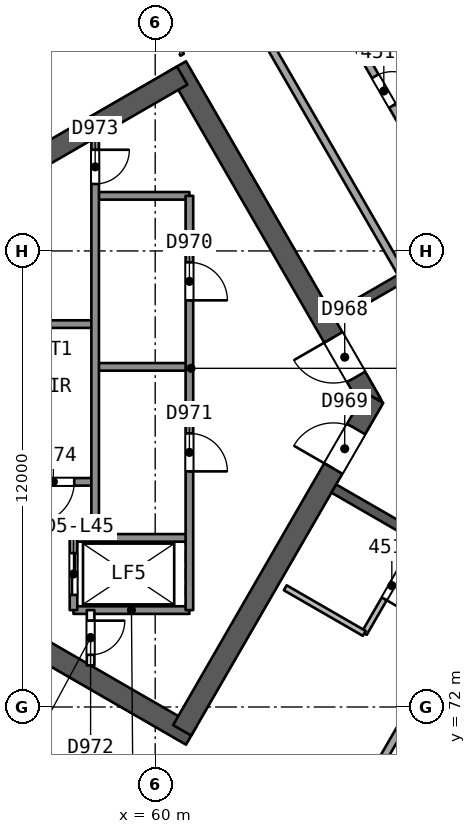
"""IFC4 building model, lengths in metres.
Left out: names, types, materials, properties, quantities, classifications, styles, units other than length and angle.
Written with IfcOpenShell. Run it as: python <this file> out.ifc"""

import sys

from ifc_helpers import new_model, si_unit, direction, frame, frame_2d, origin, place, context, subcontext, project, spatial, rectangle, extrude, element, fill, save


model = new_model("IFC4")
c1 = context("Model", 3, precision=1e-05, world=origin(), true_north=direction((0.0, 1.0)))
c2 = subcontext(c1, "Body", "Model", "MODEL_VIEW")
j1 = project(units=[si_unit("LENGTHUNIT", "METRE"), si_unit("PLANEANGLEUNIT", "RADIAN")], contexts=[c1])
p1 = place(None, origin())
s1 = spatial("IfcSite", under=j1, at=p1, CompositionType="ELEMENT")
p2 = place(p1, origin())
s2 = spatial("IfcBuilding", under=s1, at=p2, CompositionType="ELEMENT")
p3 = place(p2, frame((0.0, 0.0, 185.9)))
s3 = spatial("IfcBuildingStorey", under=s2, at=p3, CompositionType="ELEMENT", Elevation=185.9)
p4 = place(p3, frame((65.682, 80.0, 0.0), z_axis=(0.0, 0.0, 1.0), x_axis=(-0.500000202252, 0.866025287014, 0.0)))
e1 = element("IfcWall", 1, at=p4, inside=s3, PredefinedType="SHEAR", context=c2, shape_type="SweptSolid", body=[
    extrude(rectangle(XDim=10.221, YDim=0.55, at=frame_2d((5.111, 0.0))), origin(), (0.0, 0.0, 1.0), 3.7),
])
p5 = place(p4, frame((0.791, 0.0, 0.0)))
e2 = element("IfcOpeningElement", 2, at=p5, cuts=e1, PredefinedType="OPENING", context=c2, shape_type="SweptSolid", body=[
    extrude(rectangle(XDim=1.2, YDim=2.1, at=frame_2d((0.6, 1.05))), frame((0.0, 0.286, 0.0), z_axis=(0.0, -1.0, 0.0), x_axis=(1.0, 0.0, 0.0)), (0.0, 0.0, 1.0), 0.571),
])
p6 = place(p3, frame((60.709, 88.614, 0.0), z_axis=(0.0, 0.0, 1.0), x_axis=(-0.866020164116, -0.500009075263, 0.0)))
e3 = element("IfcWall", 3, at=p6, inside=s3, PredefinedType="SHEAR", context=c2, shape_type="SweptSolid", body=[
    extrude(rectangle(XDim=14.058, YDim=0.55, at=frame_2d((7.029, 0.0))), origin(), (0.0, 0.0, 1.0), 3.7),
])
p7 = place(p3, frame((48.672, 78.336, 0.0), z_axis=(0.0, 0.0, 1.0), x_axis=(0.866023530946, -0.500003243837, 0.0)))
e4 = element("IfcWall", 4, at=p7, inside=s3, PredefinedType="SHEAR", context=c2, shape_type="SweptSolid", body=[
    extrude(rectangle(XDim=14.175, YDim=0.55, at=frame_2d((7.087, 0.0))), origin(), (0.0, 0.0, 1.0), 3.7),
])
p8 = place(p3, frame((60.709, 71.386, 0.0), z_axis=(0.0, 0.0, 1.0), x_axis=(0.500015938302, 0.866016201606, 0.0)))
e5 = element("IfcWall", 5, at=p8, inside=s3, PredefinedType="SHEAR", context=c2, shape_type="SweptSolid", body=[
    extrude(rectangle(XDim=10.105, YDim=0.55, at=frame_2d((5.053, 0.0))), origin(), (0.0, 0.0, 1.0), 3.7),
])
p9 = place(p8, frame((7.955, 0.0, 0.0)))
e6 = element("IfcOpeningElement", 6, at=p9, cuts=e5, PredefinedType="OPENING", context=c2, shape_type="SweptSolid", body=[
    extrude(rectangle(XDim=1.2, YDim=2.1, at=frame_2d((0.6, 1.05))), frame((0.0, 0.286, 0.0), z_axis=(0.0, -1.0, 0.0), x_axis=(1.0, 0.0, 0.0)), (0.0, 0.0, 1.0), 0.571),
])
p10 = place(p3, frame((78.2, 90.046, 0.0), z_axis=(0.0, 0.0, 1.0), x_axis=(-0.866026492143, -0.499998114903, 0.0)))
e7 = element("IfcWall", 7, at=p10, inside=s3, PredefinedType="SHEAR", context=c2, shape_type="SweptSolid", body=[
    extrude(rectangle(XDim=15.588, YDim=0.25, at=frame_2d((7.794, 0.0))), origin(), (0.0, 0.0, 1.0), 3.25),
])
p11 = place(p10, frame((3.138, 0.0, 0.0)))
e8 = element("IfcOpeningElement", 8, at=p11, cuts=e7, PredefinedType="OPENING", context=c2, shape_type="SweptSolid", body=[
    extrude(rectangle(XDim=1.0, YDim=2.1, at=frame_2d((0.5, 1.05))), frame((0.0, 0.135, 0.0), z_axis=(0.0, -1.0, 0.0), x_axis=(1.0, 0.0, 0.0)), (0.0, 0.0, 1.0), 0.271),
])
p12 = place(p10, frame((6.415, 0.0, 0.0)))
e9 = element("IfcOpeningElement", 9, at=p12, cuts=e7, PredefinedType="OPENING", context=c2, shape_type="SweptSolid", body=[
    extrude(rectangle(XDim=1.2, YDim=2.4, at=frame_2d((0.6, 1.2))), frame((0.0, 0.135, 0.0), z_axis=(0.0, -1.0, 0.0), x_axis=(1.0, 0.0, 0.0)), (0.0, 0.0, 1.0), 0.271),
])
p13 = place(p10, frame((11.971, 0.0, 0.0)))
e10 = element("IfcOpeningElement", 10, at=p13, cuts=e7, PredefinedType="OPENING", context=c2, shape_type="SweptSolid", body=[
    extrude(rectangle(XDim=1.0, YDim=2.1, at=frame_2d((0.5, 1.05))), frame((0.0, 0.135, 0.0), z_axis=(0.0, -1.0, 0.0), x_axis=(1.0, 0.0, 0.0)), (0.0, 0.0, 1.0), 0.271),
])
p14 = place(p3, frame((64.7, 77.748, 0.0), z_axis=(0.0, 0.0, 1.0), x_axis=(0.866026492143, -0.499998114903, 0.0)))
e11 = element("IfcWall", 11, at=p14, inside=s3, PredefinedType="SHEAR", context=c2, shape_type="SweptSolid", body=[
    extrude(rectangle(XDim=15.588, YDim=0.25, at=frame_2d((7.794, 0.0))), origin(), (0.0, 0.0, 1.0), 3.25),
])
p15 = place(p14, frame((3.138, 0.0, 0.0)))
e12 = element("IfcOpeningElement", 12, at=p15, cuts=e11, PredefinedType="OPENING", context=c2, shape_type="SweptSolid", body=[
    extrude(rectangle(XDim=1.0, YDim=2.1, at=frame_2d((0.5, 1.05))), frame((0.0, 0.135, 0.0), z_axis=(0.0, -1.0, 0.0), x_axis=(1.0, 0.0, 0.0)), (0.0, 0.0, 1.0), 0.271),
])
p16 = place(p14, frame((6.175, 0.0, 0.0)))
e13 = element("IfcOpeningElement", 13, at=p16, cuts=e11, PredefinedType="OPENING", context=c2, shape_type="SweptSolid", body=[
    extrude(rectangle(XDim=0.9, YDim=2.1, at=frame_2d((0.45, 1.05))), frame((0.0, 0.135, 0.0), z_axis=(0.0, -1.0, 0.0), x_axis=(1.0, 0.0, 0.0)), (0.0, 0.0, 1.0), 0.271),
])
p17 = place(p14, frame((10.072, 0.0, 0.0)))
e14 = element("IfcOpeningElement", 14, at=p17, cuts=e11, PredefinedType="OPENING", context=c2, shape_type="SweptSolid", body=[
    extrude(rectangle(XDim=0.9, YDim=2.1, at=frame_2d((0.45, 1.05))), frame((0.0, 0.135, 0.0), z_axis=(0.0, -1.0, 0.0), x_axis=(1.0, 0.0, 0.0)), (0.0, 0.0, 1.0), 0.271),
])
p18 = place(p14, frame((13.53, 0.0, 0.0)))
e15 = element("IfcOpeningElement", 15, at=p18, cuts=e11, PredefinedType="OPENING", context=c2, shape_type="SweptSolid", body=[
    extrude(rectangle(XDim=1.0, YDim=2.1, at=frame_2d((0.5, 1.05))), frame((0.0, 0.135, 0.0), z_axis=(0.0, -1.0, 0.0), x_axis=(1.0, 0.0, 0.0)), (0.0, 0.0, 1.0), 0.271),
])
p19 = place(p3, frame((64.548, 94.985, 0.0), z_axis=(0.0, 0.0, 1.0), x_axis=(0.499998432514, -0.866026308771, 0.0)))
e16 = element("IfcWall", 16, at=p19, inside=s3, PredefinedType="PARTITIONING", context=c2, shape_type="SweptSolid", body=[
    extrude(rectangle(XDim=11.104, YDim=0.2, at=frame_2d((5.552, 0.0))), origin(), (0.0, 0.0, 1.0), 3.25),
])
p20 = place(p3, frame((59.148, 91.868, 0.0), z_axis=(0.0, 0.0, 1.0), x_axis=(0.4999794672, -0.866037258078, 0.0)))
e17 = element("IfcWall", 17, at=p20, inside=s3, PredefinedType="PARTITIONING", context=c2, shape_type="SweptSolid", body=[
    extrude(rectangle(XDim=3.125, YDim=0.1, at=frame_2d((1.562, 0.0))), origin(), (0.0, 0.0, 1.0), 3.25),
])
p21 = place(p20, frame((1.112, 0.0, 0.0)))
e18 = element("IfcOpeningElement", 18, at=p21, cuts=e17, PredefinedType="OPENING", context=c2, shape_type="SweptSolid", body=[
    extrude(rectangle(XDim=0.9, YDim=2.1, at=frame_2d((0.45, 1.05))), frame((0.0, 0.061, 0.0), z_axis=(0.0, -1.0, 0.0), x_axis=(1.0, 0.0, 0.0)), (0.0, 0.0, 1.0), 0.121),
])
p22 = place(p3, frame((66.534, 83.311, 0.0), z_axis=(0.0, 0.0, 1.0), x_axis=(-0.5000018851, 0.866024315419, 0.0)))
e19 = element("IfcWall", 19, at=p22, inside=s3, PredefinedType="PARTITIONING", context=c2, shape_type="SweptSolid", body=[
    extrude(rectangle(XDim=9.0, YDim=0.2, at=frame_2d((4.5, 0.0))), origin(), (0.0, 0.0, 1.0), 3.25),
])
p23 = place(p3, frame((63.766, 92.105, 0.0), z_axis=(0.0, 0.0, 1.0), x_axis=(0.5000018851, -0.866024315419, 0.0)))
e20 = element("IfcWall", 20, at=p23, inside=s3, PredefinedType="PARTITIONING", context=c2, shape_type="SweptSolid", body=[
    extrude(rectangle(XDim=9.0, YDim=0.2, at=frame_2d((4.5, 0.0))), origin(), (0.0, 0.0, 1.0), 3.25),
])
p24 = place(p23, frame((4.05, 0.0, 0.0)))
e21 = element("IfcOpeningElement", 21, at=p24, cuts=e20, PredefinedType="OPENING", context=c2, shape_type="SweptSolid", body=[
    extrude(rectangle(XDim=0.9, YDim=2.1, at=frame_2d((0.45, 1.05))), frame((0.0, 0.11, 0.0), z_axis=(0.0, -1.0, 0.0), x_axis=(1.0, 0.0, 0.0)), (0.0, 0.0, 1.0), 0.221),
])
p25 = place(p3, frame((66.952, 76.448, 0.0), z_axis=(0.0, 0.0, 1.0), x_axis=(-0.499987231761, -0.866032775405, 0.0)))
e22 = element("IfcWall", 22, at=p25, inside=s3, PredefinedType="PARTITIONING", context=c2, shape_type="SweptSolid", body=[
    extrude(rectangle(XDim=2.9, YDim=0.15, at=frame_2d((1.45, 0.0))), origin(), (0.0, 0.0, 1.0), 3.25),
])
p26 = place(p25, frame((1.05, 0.0, 0.0)))
e23 = element("IfcOpeningElement", 23, at=p26, cuts=e22, PredefinedType="OPENING", context=c2, shape_type="SweptSolid", body=[
    extrude(rectangle(XDim=0.8, YDim=2.1, at=frame_2d((0.4, 1.05))), frame((0.0, 0.085, 0.0), z_axis=(0.0, -1.0, 0.0), x_axis=(1.0, 0.0, 0.0)), (0.0, 0.0, 1.0), 0.171),
])
p27 = place(p3, frame((65.502, 73.937, 0.0), z_axis=(0.0, 0.0, 1.0), x_axis=(-0.865994240961, 0.500053971709, 0.0)))
e24 = element("IfcWall", 24, at=p27, inside=s3, PredefinedType="PARTITIONING", context=c2, shape_type="SweptSolid", body=[
    extrude(rectangle(XDim=2.401, YDim=0.15, at=frame_2d((1.201, 0.0))), origin(), (0.0, 0.0, 1.0), 3.25),
])
p28 = place(p3, frame((63.198, 65.794, 0.0), z_axis=(0.0, 0.0, 1.0), x_axis=(0.499998432514, 0.866026308771, 0.0)))
e25 = element("IfcWall", 25, at=p28, inside=s3, PredefinedType="PARTITIONING", context=c2, shape_type="SweptSolid", body=[
    extrude(rectangle(XDim=11.104, YDim=0.2, at=frame_2d((5.552, 0.0))), origin(), (0.0, 0.0, 1.0), 3.25),
])
p29 = place(p3, frame((42.971, 82.7, 0.0), z_axis=(0.0, 0.0, 1.0), x_axis=(0.866024890781, 0.500000888547, 0.0)))
e26 = element("IfcWall", 26, at=p29, inside=s3, PredefinedType="SOLIDWALL", context=c2, shape_type="SweptSolid", body=[
    extrude(rectangle(XDim=52.776, YDim=0.3, at=frame_2d((26.388, 0.0))), origin(), (0.0, 0.0, 1.0), 3.25),
])
p30 = place(p29, frame((20.511, 0.0, 0.0)))
e27 = element("IfcOpeningElement", 27, at=p30, cuts=e26, PredefinedType="OPENING", context=c2, shape_type="SweptSolid", body=[
    extrude(rectangle(XDim=2.4, YDim=2.4, at=frame_2d((1.2, 1.2))), frame((0.0, 0.161, 0.0), z_axis=(0.0, -1.0, 0.0), x_axis=(1.0, 0.0, 0.0)), (0.0, 0.0, 1.0), 0.321),
])
p31 = place(p29, frame((9.385, 0.0, 0.0)))
e28 = element("IfcOpeningElement", 28, at=p31, cuts=e26, PredefinedType="OPENING", context=c2, shape_type="SweptSolid", body=[
    extrude(rectangle(XDim=2.4, YDim=2.4, at=frame_2d((1.2, 1.2))), frame((0.0, 0.161, 0.0), z_axis=(0.0, -1.0, 0.0), x_axis=(1.0, 0.0, 0.0)), (0.0, 0.0, 1.0), 0.321),
])
p32 = place(p29, frame((39.984, 0.0, 0.0)))
e29 = element("IfcOpeningElement", 29, at=p32, cuts=e26, PredefinedType="OPENING", context=c2, shape_type="SweptSolid", body=[
    extrude(rectangle(XDim=2.4, YDim=2.4, at=frame_2d((1.2, 1.2))), frame((0.0, 0.161, 0.0), z_axis=(0.0, -1.0, 0.0), x_axis=(1.0, 0.0, 0.0)), (0.0, 0.0, 1.0), 0.321),
])
p33 = place(p29, frame((26.268, 0.0, 0.9)))
e30 = element("IfcOpeningElement", 30, at=p33, cuts=e26, PredefinedType="OPENING", context=c2, shape_type="SweptSolid", body=[
    extrude(rectangle(XDim=1.8, YDim=1.5, at=frame_2d((0.9, 0.75))), frame((0.0, 0.161, 0.0), z_axis=(0.0, -1.0, 0.0), x_axis=(1.0, 0.0, 0.0)), (0.0, 0.0, 1.0), 0.321),
])
p34 = place(p3, frame((88.677, 50.912, 0.0), z_axis=(0.0, 0.0, 1.0), x_axis=(-0.866024890781, 0.500000888547, 0.0)))
e31 = element("IfcWall", 31, at=p34, inside=s3, PredefinedType="SOLIDWALL", context=c2, shape_type="SweptSolid", body=[
    extrude(rectangle(XDim=52.776, YDim=0.3, at=frame_2d((26.388, 0.0))), origin(), (0.0, 0.0, 1.0), 3.25),
])
p35 = place(p34, frame((18.953, 0.0, 0.0)))
e32 = element("IfcOpeningElement", 32, at=p35, cuts=e31, PredefinedType="OPENING", context=c2, shape_type="SweptSolid", body=[
    extrude(rectangle(XDim=2.4, YDim=2.4, at=frame_2d((1.2, 1.2))), frame((0.0, 0.161, 0.0), z_axis=(0.0, -1.0, 0.0), x_axis=(1.0, 0.0, 0.0)), (0.0, 0.0, 1.0), 0.321),
])
p36 = place(p34, frame((9.385, 0.0, 0.0)))
e33 = element("IfcOpeningElement", 33, at=p36, cuts=e31, PredefinedType="OPENING", context=c2, shape_type="SweptSolid", body=[
    extrude(rectangle(XDim=2.4, YDim=2.4, at=frame_2d((1.2, 1.2))), frame((0.0, 0.161, 0.0), z_axis=(0.0, -1.0, 0.0), x_axis=(1.0, 0.0, 0.0)), (0.0, 0.0, 1.0), 0.321),
])
p37 = place(p34, frame((39.984, 0.0, 0.0)))
e34 = element("IfcOpeningElement", 34, at=p37, cuts=e31, PredefinedType="OPENING", context=c2, shape_type="SweptSolid", body=[
    extrude(rectangle(XDim=2.4, YDim=2.4, at=frame_2d((1.2, 1.2))), frame((0.0, 0.161, 0.0), z_axis=(0.0, -1.0, 0.0), x_axis=(1.0, 0.0, 0.0)), (0.0, 0.0, 1.0), 0.321),
])
p38 = place(p34, frame((26.657, 0.0, 0.9)))
e35 = element("IfcOpeningElement", 35, at=p38, cuts=e31, PredefinedType="OPENING", context=c2, shape_type="SweptSolid", body=[
    extrude(rectangle(XDim=1.8, YDim=1.5, at=frame_2d((0.9, 0.75))), frame((0.0, 0.161, 0.0), z_axis=(0.0, -1.0, 0.0), x_axis=(1.0, 0.0, 0.0)), (0.0, 0.0, 1.0), 0.321),
])
p39 = place(p34, frame((22.76, 0.0, 0.9)))
e36 = element("IfcOpeningElement", 36, at=p39, cuts=e31, PredefinedType="OPENING", context=c2, shape_type="SweptSolid", body=[
    extrude(rectangle(XDim=1.8, YDim=1.5, at=frame_2d((0.9, 0.75))), frame((0.0, 0.161, 0.0), z_axis=(0.0, -1.0, 0.0), x_axis=(1.0, 0.0, 0.0)), (0.0, 0.0, 1.0), 0.321),
])
p40 = place(p3, frame((60.9, 85.45, 0.0), z_axis=(0.0, 0.0, 1.0), x_axis=(-1.0, 0.0, 0.0)))
e37 = element("IfcWall", 37, at=p40, inside=s3, PredefinedType="SOLIDWALL", context=c2, shape_type="SweptSolid", body=[
    extrude(rectangle(XDim=2.48, YDim=0.2, at=frame_2d((1.24, 0.0))), origin(), (0.0, 0.0, 1.0), 3.25),
])
p41 = place(p3, frame((58.42, 82.075, 0.0), z_axis=(0.0, 0.0, 1.0), x_axis=(-1.0, 0.0, 0.0)))
e38 = element("IfcWall", 38, at=p41, inside=s3, PredefinedType="SOLIDWALL", context=c2, shape_type="SweptSolid", body=[
    extrude(rectangle(XDim=7.7, YDim=0.2, at=frame_2d((3.85, 0.0))), origin(), (0.0, 0.0, 1.0), 3.25),
])
p42 = place(p3, frame((60.9, 80.95, 0.0), z_axis=(0.0, 0.0, 1.0), x_axis=(-1.0, 0.0, 0.0)))
e39 = element("IfcWall", 39, at=p42, inside=s3, PredefinedType="SOLIDWALL", context=c2, shape_type="SweptSolid", body=[
    extrude(rectangle(XDim=2.48, YDim=0.2, at=frame_2d((1.24, 0.0))), origin(), (0.0, 0.0, 1.0), 3.25),
])
p43 = place(p3, frame((58.42, 77.925, 0.0), z_axis=(0.0, 0.0, 1.0), x_axis=(-1.0, 0.0, 0.0)))
e40 = element("IfcWall", 40, at=p43, inside=s3, PredefinedType="SOLIDWALL", context=c2, shape_type="SweptSolid", body=[
    extrude(rectangle(XDim=7.7, YDim=0.2, at=frame_2d((3.85, 0.0))), origin(), (0.0, 0.0, 1.0), 3.25),
])
p44 = place(p43, frame((0.55, 0.0, 0.0)))
e41 = element("IfcOpeningElement", 41, at=p44, cuts=e40, PredefinedType="OPENING", context=c2, shape_type="SweptSolid", body=[
    extrude(rectangle(XDim=1.1, YDim=2.1, at=frame_2d((0.55, 1.05))), frame((0.0, 0.11, 0.0), z_axis=(0.0, -1.0, 0.0), x_axis=(1.0, 0.0, 0.0)), (0.0, 0.0, 1.0), 0.221),
])
for number, where, z_axis, x_axis in (
    (42, (60.9, 76.45, 0.0), (0.0, 0.0, 1.0), (-1.0, 0.0, 0.0)),
    (43, (60.9, 74.55, 0.0), (0.0, 0.0, 1.0), (-1.0, 0.0, 0.0)),
):
    element("IfcWall", number, at=place(p3, frame(where, z_axis=z_axis, x_axis=x_axis)), inside=s3, PredefinedType="SOLIDWALL", context=c2, shape_type="SweptSolid", body=[
        extrude(rectangle(XDim=3.05, YDim=0.2, at=frame_2d((1.525, 0.0))), origin(), (0.0, 0.0, 1.0), 3.25),
    ])
p45 = place(p3, frame((60.9, 85.45, 0.0), z_axis=(0.0, 0.0, 1.0), x_axis=(0.0, -1.0, 0.0)))
e44 = element("IfcWall", 44, at=p45, inside=s3, PredefinedType="SOLIDWALL", context=c2, shape_type="SweptSolid", body=[
    extrude(rectangle(XDim=10.9, YDim=0.2, at=frame_2d((5.45, 0.0))), origin(), (0.0, 0.0, 1.0), 3.25),
])
p46 = place(p45, frame((1.75, 0.0, 0.0)))
e45 = element("IfcOpeningElement", 45, at=p46, cuts=e44, PredefinedType="OPENING", context=c2, shape_type="SweptSolid", body=[
    extrude(rectangle(XDim=1.0, YDim=2.1, at=frame_2d((0.5, 1.05))), frame((0.0, 0.11, 0.0), z_axis=(0.0, -1.0, 0.0), x_axis=(1.0, 0.0, 0.0)), (0.0, 0.0, 1.0), 0.221),
])
p47 = place(p45, frame((6.25, 0.0, 0.0)))
e46 = element("IfcOpeningElement", 46, at=p47, cuts=e44, PredefinedType="OPENING", context=c2, shape_type="SweptSolid", body=[
    extrude(rectangle(XDim=1.0, YDim=2.1, at=frame_2d((0.5, 1.05))), frame((0.0, 0.11, 0.0), z_axis=(0.0, -1.0, 0.0), x_axis=(1.0, 0.0, 0.0)), (0.0, 0.0, 1.0), 0.221),
])
p48 = place(p3, frame((58.42, 86.974, 0.0), z_axis=(0.0, 0.0, 1.0), x_axis=(0.0, -1.0, 0.0)))
e47 = element("IfcWall", 47, at=p48, inside=s3, PredefinedType="SOLIDWALL", context=c2, shape_type="SweptSolid", body=[
    extrude(rectangle(XDim=10.524, YDim=0.2, at=frame_2d((5.262, 0.0))), origin(), (0.0, 0.0, 1.0), 3.25),
])
p49 = place(p48, frame((0.312, 0.0, 0.0)))
e48 = element("IfcOpeningElement", 48, at=p49, cuts=e47, PredefinedType="OPENING", context=c2, shape_type="SweptSolid", body=[
    extrude(rectangle(XDim=0.9, YDim=2.1, at=frame_2d((0.45, 1.05))), frame((0.0, 0.11, 0.0), z_axis=(0.0, -1.0, 0.0), x_axis=(1.0, 0.0, 0.0)), (0.0, 0.0, 1.0), 0.221),
])
p50 = place(p3, frame((58.3, 74.55, 0.0), z_axis=(0.0, 0.0, 1.0), x_axis=(0.0, -1.0, 0.0)))
e49 = element("IfcWall", 49, at=p50, inside=s3, PredefinedType="PARTITIONING", context=c2, shape_type="SweptSolid", body=[
    extrude(rectangle(XDim=1.455, YDim=0.2, at=frame_2d((0.728, 0.0))), origin(), (0.0, 0.0, 1.0), 3.25),
])
p51 = place(p50, frame((0.278, 0.0, 0.0)))
e50 = element("IfcOpeningElement", 50, at=p51, cuts=e49, PredefinedType="OPENING", context=c2, shape_type="SweptSolid", body=[
    extrude(rectangle(XDim=0.9, YDim=2.1, at=frame_2d((0.45, 1.05))), frame((0.0, 0.11, 0.0), z_axis=(0.0, -1.0, 0.0), x_axis=(1.0, 0.0, 0.0)), (0.0, 0.0, 1.0), 0.221),
])
p52 = place(p3, frame((57.85, 76.45, 0.0), z_axis=(0.0, 0.0, 1.0), x_axis=(0.0, -1.0, 0.0)))
e51 = element("IfcWall", 51, at=p52, inside=s3, PredefinedType="SOLIDWALL", context=c2, shape_type="SweptSolid", body=[
    extrude(rectangle(XDim=1.9, YDim=0.2, at=frame_2d((0.95, 0.0))), origin(), (0.0, 0.0, 1.0), 3.25),
])
p53 = place(p52, frame((0.4, 0.0, 0.0)))
e52 = element("IfcOpeningElement", 52, at=p53, cuts=e51, PredefinedType="OPENING", context=c2, shape_type="SweptSolid", body=[
    extrude(rectangle(XDim=1.1, YDim=2.1, at=frame_2d((0.55, 1.05))), frame((0.0, 0.11, 0.0), z_axis=(0.0, -1.0, 0.0), x_axis=(1.0, 0.0, 0.0)), (0.0, 0.0, 1.0), 0.221),
])
p54 = place(p24, origin())
e53 = element("IfcDoor", 53, at=p54, inside=s3, OperationType="SINGLE_SWING_RIGHT", PredefinedType="NOTDEFINED", context=c2, shape_type="SweptSolid", body=[
    extrude(rectangle(XDim=0.9, YDim=2.1, at=frame_2d((0.45, 1.05))), frame((0.0, 0.025, 0.0), z_axis=(0.0, -1.0, 0.0), x_axis=(1.0, 0.0, 0.0)), (0.0, 0.0, 1.0), 0.05),
])
fill(e21, e53)
p55 = place(p26, origin())
e54 = element("IfcDoor", 54, at=p55, inside=s3, OperationType="SINGLE_SWING_RIGHT", PredefinedType="NOTDEFINED", context=c2, shape_type="SweptSolid", body=[
    extrude(rectangle(XDim=0.8, YDim=2.1, at=frame_2d((0.4, 1.05))), frame((0.0, 0.025, 0.0), z_axis=(0.0, -1.0, 0.0), x_axis=(1.0, 0.0, 0.0)), (0.0, 0.0, 1.0), 0.05),
])
fill(e23, e54)
p56 = place(p5, origin())
e55 = element("IfcDoor", 55, at=p56, inside=s3, OperationType="SINGLE_SWING_RIGHT", PredefinedType="NOTDEFINED", context=c2, shape_type="SweptSolid", body=[
    extrude(rectangle(XDim=1.2, YDim=2.1, at=frame_2d((0.6, 1.05))), frame((0.0, 0.025, 0.0), z_axis=(0.0, -1.0, 0.0), x_axis=(1.0, 0.0, 0.0)), (0.0, 0.0, 1.0), 0.05),
])
fill(e2, e55)
p57 = place(p9, origin())
e56 = element("IfcDoor", 56, at=p57, inside=s3, OperationType="SINGLE_SWING_LEFT", PredefinedType="NOTDEFINED", context=c2, shape_type="SweptSolid", body=[
    extrude(rectangle(XDim=1.2, YDim=2.1, at=frame_2d((0.6, 1.05))), frame((0.0, 0.025, 0.0), z_axis=(0.0, -1.0, 0.0), x_axis=(1.0, 0.0, 0.0)), (0.0, 0.0, 1.0), 0.05),
])
fill(e6, e56)
p58 = place(p53, origin())
e57 = element("IfcDoor", 57, at=p58, inside=s3, OperationType="SLIDING_TO_RIGHT", PredefinedType="NOTDEFINED", context=c2, shape_type="SweptSolid", body=[
    extrude(rectangle(XDim=1.1, YDim=2.1, at=frame_2d((0.55, 1.05))), frame((0.0, 0.025, 0.0), z_axis=(0.0, -1.0, 0.0), x_axis=(1.0, 0.0, 0.0)), (0.0, 0.0, 1.0), 0.05),
])
fill(e52, e57)
p59 = place(p46, origin())
e58 = element("IfcDoor", 58, at=p59, inside=s3, OperationType="SINGLE_SWING_RIGHT", PredefinedType="NOTDEFINED", context=c2, shape_type="SweptSolid", body=[
    extrude(rectangle(XDim=1.0, YDim=2.1, at=frame_2d((0.5, 1.05))), frame((0.0, 0.025, 0.0), z_axis=(0.0, -1.0, 0.0), x_axis=(1.0, 0.0, 0.0)), (0.0, 0.0, 1.0), 0.05),
])
fill(e45, e58)
p60 = place(p47, origin())
e59 = element("IfcDoor", 59, at=p60, inside=s3, OperationType="SINGLE_SWING_RIGHT", PredefinedType="NOTDEFINED", context=c2, shape_type="SweptSolid", body=[
    extrude(rectangle(XDim=1.0, YDim=2.1, at=frame_2d((0.5, 1.05))), frame((0.0, 0.025, 0.0), z_axis=(0.0, -1.0, 0.0), x_axis=(1.0, 0.0, 0.0)), (0.0, 0.0, 1.0), 0.05),
])
fill(e46, e59)
p61 = place(p51, origin())
e60 = element("IfcDoor", 60, at=p61, inside=s3, OperationType="SINGLE_SWING_LEFT", PredefinedType="NOTDEFINED", context=c2, shape_type="SweptSolid", body=[
    extrude(rectangle(XDim=0.9, YDim=2.1, at=frame_2d((0.45, 1.05))), frame((0.0, 0.025, 0.0), z_axis=(0.0, -1.0, 0.0), x_axis=(1.0, 0.0, 0.0)), (0.0, 0.0, 1.0), 0.05),
])
fill(e50, e60)
p62 = place(p49, origin())
e61 = element("IfcDoor", 61, at=p62, inside=s3, OperationType="SINGLE_SWING_LEFT", PredefinedType="NOTDEFINED", context=c2, shape_type="SweptSolid", body=[
    extrude(rectangle(XDim=0.9, YDim=2.1, at=frame_2d((0.45, 1.05))), frame((0.0, 0.025, 0.0), z_axis=(0.0, -1.0, 0.0), x_axis=(1.0, 0.0, 0.0)), (0.0, 0.0, 1.0), 0.05),
])
fill(e48, e61)
p63 = place(p44, origin())
e62 = element("IfcDoor", 62, at=p63, inside=s3, OperationType="SINGLE_SWING_RIGHT", PredefinedType="NOTDEFINED", context=c2, shape_type="SweptSolid", body=[
    extrude(rectangle(XDim=1.1, YDim=2.1, at=frame_2d((0.55, 1.05))), frame((0.0, 0.025, 0.0), z_axis=(0.0, -1.0, 0.0), x_axis=(1.0, 0.0, 0.0)), (0.0, 0.0, 1.0), 0.05),
])
fill(e41, e62)
save(model, sys.argv[1])
